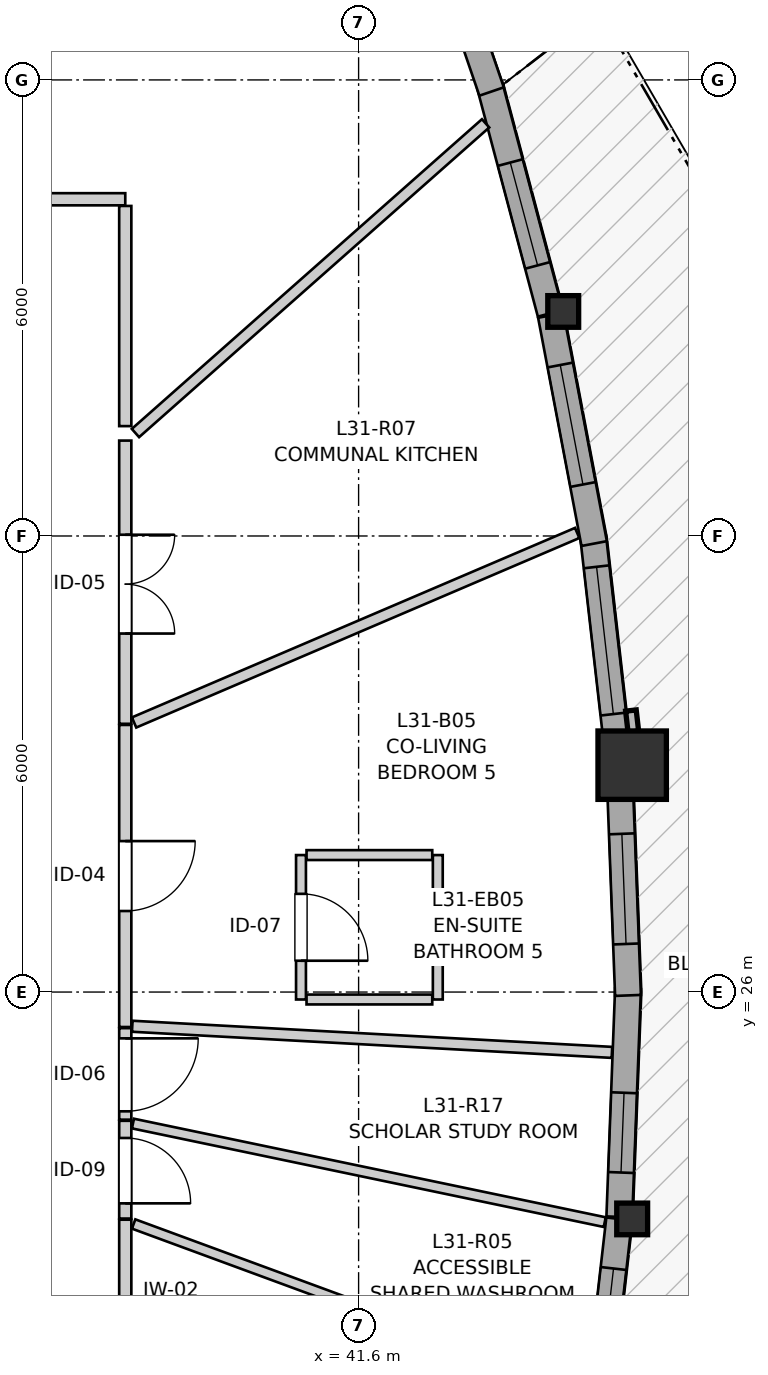
"""IFC4 building model, lengths in metres.
Left out: names, types, materials, properties, quantities, classifications, styles, units other than length and angle.
Written with IfcOpenShell. Run it as: python <this file> out.ifc"""

import sys

from ifc_helpers import new_model, si_unit, direction, frame, frame_2d, origin, origin_2d, place, context, subcontext, project, spatial, rectangle, i_section, extrude, source, transform, mapped, element, fill, save


model = new_model("IFC4")
c1 = context("Model", 3, precision=1e-05, world=origin(), true_north=direction((0.0, 1.0)))
c2 = subcontext(c1, "Body", "Model", "MODEL_VIEW")
j1 = project(units=[si_unit("LENGTHUNIT", "METRE"), si_unit("PLANEANGLEUNIT", "RADIAN")], contexts=[c1])
p1 = place(None, origin())
s1 = spatial("IfcSite", under=j1, at=p1, CompositionType="ELEMENT")
p2 = place(p1, origin())
s2 = spatial("IfcBuilding", under=s1, at=p2, CompositionType="ELEMENT")
p3 = place(p2, frame((0.0, 0.0, 105.6)))
s3 = spatial("IfcBuildingStorey", under=s2, at=p3, CompositionType="ELEMENT", Elevation=105.6)
m1 = source(origin(), c2, "Body", "SweptSolid", [
    extrude(i_section(OverallWidth=0.406, OverallDepth=0.416, WebThickness=0.027, FlangeThickness=0.044, FilletRadius=0.015, at=origin_2d()), origin(), (0.0, 0.0, 1.0), 2.935),
])
p4 = place(p3, frame((45.199, 23.015, 0.0), z_axis=(0.0, 0.0, 1.0), x_axis=(1.0, 0.0, 0.0)))
e1 = element("IfcColumn", 1, at=p4, inside=s3, PredefinedType="PILASTER", context=c2, shape_type="MappedRepresentation", body=[
    mapped(m1, transform((0.0, 0.0, 0.0), x_axis=(1.0, 0.0, 0.0), y_axis=(0.0, 1.0, 0.0), z_axis=(0.0, 0.0, 1.0), scale=1.0)),
])
m2 = source(origin(), c2, "Body", "SweptSolid", [
    extrude(rectangle(XDim=0.9, YDim=0.9, at=origin_2d()), origin(), (0.0, 0.0, 1.0), 2.935),
])
p5 = place(p3, frame((45.199, 28.985, 0.0), z_axis=(0.0, 0.0, 1.0), x_axis=(1.0, 0.0, 0.0)))
e2 = element("IfcColumn", 2, at=p5, inside=s3, PredefinedType="COLUMN", context=c2, shape_type="MappedRepresentation", body=[
    mapped(m2, transform((0.0, 0.0, 0.0), x_axis=(1.0, 0.0, 0.0), y_axis=(0.0, 1.0, 0.0), z_axis=(0.0, 0.0, 1.0), scale=1.0)),
])
p6 = place(p3, frame((44.292, 34.954, 0.0), z_axis=(0.0, 0.0, 1.0), x_axis=(1.0, 0.0, 0.0)))
e3 = element("IfcColumn", 3, at=p6, inside=s3, PredefinedType="PILASTER", context=c2, shape_type="MappedRepresentation", body=[
    mapped(m1, transform((0.0, 0.0, 0.0), x_axis=(1.0, 0.0, 0.0), y_axis=(0.0, 1.0, 0.0), z_axis=(0.0, 0.0, 1.0), scale=1.0)),
])
p7 = place(p3, frame((44.686, 20.012, 0.0), z_axis=(0.0, 0.0, 1.0), x_axis=(0.113268604106, 0.993564403209, 0.0)))
e4 = element("IfcWall", 4, at=p7, inside=s3, PredefinedType="SOLIDWALL", context=c2, shape_type="SweptSolid", body=[
    extrude(rectangle(XDim=3.022, YDim=0.34, at=frame_2d((1.511, 0.0))), origin(), (0.0, 0.0, 1.0), 2.465),
])
p8 = place(p7, frame((1.316, 0.0, 0.82)))
e5 = element("IfcOpeningElement", 5, at=p8, cuts=e4, PredefinedType="OPENING", context=c2, shape_type="SweptSolid", body=[
    extrude(rectangle(XDim=1.05, YDim=1.45, at=frame_2d((0.525, 0.725))), frame((0.0, 0.18, 0.0), z_axis=(0.0, -1.0, 0.0), x_axis=(1.0, 0.0, 0.0)), (0.0, 0.0, 1.0), 0.36),
])
p9 = place(p3, frame((45.031, 23.042, 0.0), z_axis=(0.0, 0.0, 1.0), x_axis=(0.037943223979, 0.999279896603, 0.0)))
e6 = element("IfcWall", 6, at=p9, inside=s3, PredefinedType="SOLIDWALL", context=c2, shape_type="SweptSolid", body=[
    extrude(rectangle(XDim=3.005, YDim=0.34, at=frame_2d((1.502, 0.0))), origin(), (0.0, 0.0, 1.0), 2.465),
])
p10 = place(p9, frame((0.584, 0.0, 0.82)))
e7 = element("IfcOpeningElement", 7, at=p10, cuts=e6, PredefinedType="OPENING", context=c2, shape_type="SweptSolid", body=[
    extrude(rectangle(XDim=1.05, YDim=1.45, at=frame_2d((0.525, 0.725))), frame((0.0, 0.18, 0.0), z_axis=(0.0, -1.0, 0.0), x_axis=(1.0, 0.0, 0.0)), (0.0, 0.0, 1.0), 0.36),
])
p11 = place(p3, frame((45.145, 25.956, 0.0), z_axis=(0.0, 0.0, 1.0), x_axis=(-0.038000333161, 0.9992777265, 0.0)))
e8 = element("IfcWall", 8, at=p11, inside=s3, PredefinedType="SOLIDWALL", context=c2, shape_type="SweptSolid", body=[
    extrude(rectangle(XDim=2.795, YDim=0.34, at=frame_2d((1.397, 0.0))), origin(), (0.0, 0.0, 1.0), 2.465),
])
p12 = place(p11, frame((0.677, 0.0, 0.82)))
e9 = element("IfcOpeningElement", 9, at=p12, cuts=e8, PredefinedType="OPENING", context=c2, shape_type="SweptSolid", body=[
    extrude(rectangle(XDim=1.45, YDim=1.25, at=frame_2d((0.725, 0.625))), frame((0.0, 0.18, 0.0), z_axis=(0.0, -1.0, 0.0), x_axis=(1.0, 0.0, 0.0)), (0.0, 0.0, 1.0), 0.36),
])
p13 = place(p3, frame((45.004, 29.194, 0.0), z_axis=(0.0, 0.0, 1.0), x_axis=(-0.113223342564, 0.993569562083, 0.0)))
e10 = element("IfcWall", 10, at=p13, inside=s3, PredefinedType="SOLIDWALL", context=c2, shape_type="SweptSolid", body=[
    extrude(rectangle(XDim=2.812, YDim=0.34, at=frame_2d((1.406, 0.0))), origin(), (0.0, 0.0, 1.0), 2.465),
])
p14 = place(p13, frame((0.466, 0.0, 0.82)))
e11 = element("IfcOpeningElement", 11, at=p14, cuts=e10, PredefinedType="OPENING", context=c2, shape_type="SweptSolid", body=[
    extrude(rectangle(XDim=1.95, YDim=1.4, at=frame_2d((0.975, 0.7))), frame((0.0, 0.18, 0.0), z_axis=(0.0, -1.0, 0.0), x_axis=(1.0, 0.0, 0.0)), (0.0, 0.0, 1.0), 0.36),
])
p15 = place(p3, frame((44.699, 31.9, 0.0), z_axis=(0.0, 0.0, 1.0), x_axis=(-0.186689944156, 0.982418884566, 0.0)))
e12 = element("IfcWall", 12, at=p15, inside=s3, PredefinedType="SOLIDWALL", context=c2, shape_type="SweptSolid", body=[
    extrude(rectangle(XDim=3.056, YDim=0.34, at=frame_2d((1.528, 0.0))), origin(), (0.0, 0.0, 1.0), 2.465),
])
p16 = place(p15, frame((0.791, 0.0, 0.82)))
e13 = element("IfcOpeningElement", 13, at=p16, cuts=e12, PredefinedType="OPENING", context=c2, shape_type="SweptSolid", body=[
    extrude(rectangle(XDim=1.6, YDim=1.35, at=frame_2d((0.8, 0.675))), frame((0.0, 0.18, 0.0), z_axis=(0.0, -1.0, 0.0), x_axis=(1.0, 0.0, 0.0)), (0.0, 0.0, 1.0), 0.36),
])
p17 = place(p3, frame((44.123, 34.93, 0.0), z_axis=(0.0, 0.0, 1.0), x_axis=(-0.257080487516, 0.96638999526, 0.0)))
e14 = element("IfcWall", 14, at=p17, inside=s3, PredefinedType="SOLIDWALL", context=c2, shape_type="SweptSolid", body=[
    extrude(rectangle(XDim=3.106, YDim=0.34, at=frame_2d((1.553, 0.0))), origin(), (0.0, 0.0, 1.0), 2.465),
])
p18 = place(p17, frame((0.652, 0.0, 0.82)))
e15 = element("IfcOpeningElement", 15, at=p18, cuts=e14, PredefinedType="OPENING", context=c2, shape_type="SweptSolid", body=[
    extrude(rectangle(XDim=1.4, YDim=1.35, at=frame_2d((0.7, 0.675))), frame((0.0, 0.18, 0.0), z_axis=(0.0, -1.0, 0.0), x_axis=(1.0, 0.0, 0.0)), (0.0, 0.0, 1.0), 0.36),
])
p19 = place(p3, frame((43.35, 37.848, 0.0), z_axis=(0.0, 0.0, 1.0), x_axis=(-0.323561473353, 0.946207151189, 0.0)))
e16 = element("IfcWall", 16, at=p19, inside=s3, PredefinedType="SOLIDWALL", context=c2, shape_type="SweptSolid", body=[
    extrude(rectangle(XDim=2.962, YDim=0.34, at=frame_2d((1.481, 0.0))), origin(), (0.0, 0.0, 1.0), 2.465),
])
p20 = place(p19, frame((0.861, 0.0, 0.82)))
e17 = element("IfcOpeningElement", 17, at=p20, cuts=e16, PredefinedType="OPENING", context=c2, shape_type="SweptSolid", body=[
    extrude(rectangle(XDim=1.25, YDim=1.35, at=frame_2d((0.625, 0.675))), frame((0.0, 0.18, 0.0), z_axis=(0.0, -1.0, 0.0), x_axis=(1.0, 0.0, 0.0)), (0.0, 0.0, 1.0), 0.36),
])
p21 = place(p3, frame((38.53, 23.005, 0.0), z_axis=(0.0, 0.0, 1.0), x_axis=(0.0, -1.0, 0.0)))
e18 = element("IfcWall", 18, at=p21, inside=s3, PredefinedType="PARTITIONING", context=c2, shape_type="SweptSolid", body=[
    extrude(rectangle(XDim=6.157, YDim=0.16, at=frame_2d((3.079, 0.0))), origin(), (0.0, 0.0, 1.0), 2.935),
])
p22 = place(p21, frame((2.615, 0.0, 0.0)))
e19 = element("IfcOpeningElement", 19, at=p22, cuts=e18, PredefinedType="OPENING", context=c2, shape_type="SweptSolid", body=[
    extrude(rectangle(XDim=0.92, YDim=2.1, at=frame_2d((0.46, 1.05))), frame((0.0, 0.09, 0.0), z_axis=(0.0, -1.0, 0.0), x_axis=(1.0, 0.0, 0.0)), (0.0, 0.0, 1.0), 0.18),
])
p23 = place(p3, frame((33.906, 36.43, 0.0), z_axis=(0.0, 0.0, 1.0), x_axis=(1.0, 0.0, 0.0)))
e20 = element("IfcWall", 20, at=p23, inside=s3, PredefinedType="PARTITIONING", context=c2, shape_type="SweptSolid", body=[
    extrude(rectangle(XDim=4.624, YDim=0.16, at=frame_2d((2.312, 0.0))), origin(), (0.0, 0.0, 1.0), 2.573),
])
p24 = place(p23, frame((1.84, 0.0, 0.0)))
e21 = element("IfcOpeningElement", 21, at=p24, cuts=e20, PredefinedType="OPENING", context=c2, shape_type="SweptSolid", body=[
    extrude(rectangle(XDim=0.96, YDim=2.1, at=frame_2d((0.48, 1.05))), frame((0.0, 0.09, 0.0), z_axis=(0.0, -1.0, 0.0), x_axis=(1.0, 0.0, 0.0)), (0.0, 0.0, 1.0), 0.18),
])
p25 = place(p3, frame((38.53, 29.514, 0.0), z_axis=(0.0, 0.0, 1.0), x_axis=(0.0, -1.0, 0.0)))
e22 = element("IfcWall", 22, at=p25, inside=s3, PredefinedType="PARTITIONING", context=c2, shape_type="SweptSolid", body=[
    extrude(rectangle(XDim=3.974, YDim=0.16, at=frame_2d((1.987, 0.0))), origin(), (0.0, 0.0, 1.0), 2.935),
])
p26 = place(p25, frame((1.528, 0.0, 0.0)))
e23 = element("IfcOpeningElement", 23, at=p26, cuts=e22, PredefinedType="OPENING", context=c2, shape_type="SweptSolid", body=[
    extrude(rectangle(XDim=0.92, YDim=2.1, at=frame_2d((0.46, 1.05))), frame((0.0, 0.09, 0.0), z_axis=(0.0, -1.0, 0.0), x_axis=(1.0, 0.0, 0.0)), (0.0, 0.0, 1.0), 0.18),
])
p27 = place(p3, frame((38.53, 33.255, 0.0), z_axis=(0.0, 0.0, 1.0), x_axis=(0.0, -1.0, 0.0)))
e24 = element("IfcWall", 24, at=p27, inside=s3, PredefinedType="PARTITIONING", context=c2, shape_type="SweptSolid", body=[
    extrude(rectangle(XDim=3.726, YDim=0.16, at=frame_2d((1.863, 0.0))), origin(), (0.0, 0.0, 1.0), 2.935),
])
p28 = place(p27, frame((1.239, 0.0, 0.0)))
e25 = element("IfcOpeningElement", 25, at=p28, cuts=e24, PredefinedType="OPENING", context=c2, shape_type="SweptSolid", body=[
    extrude(rectangle(XDim=1.3, YDim=2.1, at=frame_2d((0.65, 1.05))), frame((0.0, 0.09, 0.0), z_axis=(0.0, -1.0, 0.0), x_axis=(1.0, 0.0, 0.0)), (0.0, 0.0, 1.0), 0.18),
])
p29 = place(p3, frame((40.842, 27.802, 0.0), z_axis=(0.0, 0.0, 1.0), x_axis=(0.0, -1.0, 0.0)))
e26 = element("IfcWall", 26, at=p29, inside=s3, PredefinedType="PARTITIONING", context=c2, shape_type="SweptSolid", body=[
    extrude(rectangle(XDim=1.9, YDim=0.13, at=frame_2d((0.95, 0.0))), origin(), (0.0, 0.0, 1.0), 2.935),
])
p30 = place(p29, frame((0.51, 0.0, 0.0)))
e27 = element("IfcOpeningElement", 27, at=p30, cuts=e26, PredefinedType="OPENING", context=c2, shape_type="SweptSolid", body=[
    extrude(rectangle(XDim=0.88, YDim=2.05, at=frame_2d((0.44, 1.025))), frame((0.0, 0.075, 0.0), z_axis=(0.0, -1.0, 0.0), x_axis=(1.0, 0.0, 0.0)), (0.0, 0.0, 1.0), 0.15),
])
p31 = place(p3, frame((38.53, 24.306, 0.0), z_axis=(0.0, 0.0, 1.0), x_axis=(0.0, -1.0, 0.0)))
e28 = element("IfcWall", 28, at=p31, inside=s3, PredefinedType="PARTITIONING", context=c2, shape_type="SweptSolid", body=[
    extrude(rectangle(XDim=1.286, YDim=0.16, at=frame_2d((0.643, 0.0))), origin(), (0.0, 0.0, 1.0), 2.935),
])
p32 = place(p31, frame((0.226, 0.0, 0.0)))
e29 = element("IfcOpeningElement", 29, at=p32, cuts=e28, PredefinedType="OPENING", context=c2, shape_type="SweptSolid", body=[
    extrude(rectangle(XDim=0.86, YDim=2.05, at=frame_2d((0.43, 1.025))), frame((0.0, 0.09, 0.0), z_axis=(0.0, -1.0, 0.0), x_axis=(1.0, 0.0, 0.0)), (0.0, 0.0, 1.0), 0.18),
])
p33 = place(p3, frame((38.53, 25.525, 0.0), z_axis=(0.0, 0.0, 1.0), x_axis=(0.0, -1.0, 0.0)))
e30 = element("IfcWall", 30, at=p33, inside=s3, PredefinedType="PARTITIONING", context=c2, shape_type="SweptSolid", body=[
    extrude(rectangle(XDim=1.204, YDim=0.16, at=frame_2d((0.602, 0.0))), origin(), (0.0, 0.0, 1.0), 2.935),
])
p34 = place(p33, frame((0.134, 0.0, 0.0)))
e31 = element("IfcOpeningElement", 31, at=p34, cuts=e30, PredefinedType="OPENING", context=c2, shape_type="SweptSolid", body=[
    extrude(rectangle(XDim=0.96, YDim=2.1, at=frame_2d((0.48, 1.05))), frame((0.0, 0.09, 0.0), z_axis=(0.0, -1.0, 0.0), x_axis=(1.0, 0.0, 0.0)), (0.0, 0.0, 1.0), 0.18),
])
p35 = place(p3, frame((38.646, 29.546, 0.0), z_axis=(0.0, 0.0, 1.0), x_axis=(0.919441504603, 0.393226804293, 0.0)))
e32 = element("IfcWall", 32, at=p35, inside=s3, PredefinedType="PARTITIONING", context=c2, shape_type="SweptSolid", body=[
    extrude(rectangle(XDim=6.341, YDim=0.145, at=frame_2d((3.17, 0.0))), origin(), (0.0, 0.0, 1.0), 2.935),
])
p36 = place(p3, frame((38.64, 22.948, 0.0), z_axis=(0.0, 0.0, 1.0), x_axis=(0.938426101424, -0.3454800315, 0.0)))
e33 = element("IfcWall", 33, at=p36, inside=s3, PredefinedType="PARTITIONING", context=c2, shape_type="SweptSolid", body=[
    extrude(rectangle(XDim=6.327, YDim=0.13, at=frame_2d((3.164, 0.0))), origin(), (0.0, 0.0, 1.0), 2.935),
])
p37 = place(p3, frame((38.631, 24.27, 0.0), z_axis=(0.0, 0.0, 1.0), x_axis=(0.978856283814, -0.204549201019, 0.0)))
e34 = element("IfcWall", 34, at=p37, inside=s3, PredefinedType="PARTITIONING", context=c2, shape_type="SweptSolid", body=[
    extrude(rectangle(XDim=6.341, YDim=0.13, at=frame_2d((3.171, 0.0))), origin(), (0.0, 0.0, 1.0), 2.935),
])
p38 = place(p3, frame((38.622, 25.55, 0.0), z_axis=(0.0, 0.0, 1.0), x_axis=(0.998518036703, -0.054421782211, 0.0)))
e35 = element("IfcWall", 35, at=p38, inside=s3, PredefinedType="PARTITIONING", context=c2, shape_type="SweptSolid", body=[
    extrude(rectangle(XDim=6.321, YDim=0.145, at=frame_2d((3.16, 0.0))), origin(), (0.0, 0.0, 1.0), 2.935),
])
p39 = place(p3, frame((38.664, 33.354, 0.0), z_axis=(0.0, 0.0, 1.0), x_axis=(0.749069296105, 0.662491652501, 0.0)))
e36 = element("IfcWall", 36, at=p39, inside=s3, PredefinedType="PARTITIONING", context=c2, shape_type="SweptSolid", body=[
    extrude(rectangle(XDim=6.15, YDim=0.145, at=frame_2d((3.075, 0.0))), origin(), (0.0, 0.0, 1.0), 2.935),
])
p40 = place(p3, frame((38.53, 33.446, 0.0), z_axis=(0.0, 0.0, 1.0), x_axis=(0.0, 1.0, 0.0)))
e37 = element("IfcWall", 37, at=p40, inside=s3, PredefinedType="PARTITIONING", context=c2, shape_type="SweptSolid", body=[
    extrude(rectangle(XDim=2.896, YDim=0.16, at=frame_2d((1.448, 0.0))), origin(), (0.0, 0.0, 1.0), 2.573),
])
p41 = place(p3, frame((42.642, 25.902, 0.0), z_axis=(0.0, 0.0, 1.0), x_axis=(0.0, 1.0, 0.0)))
e38 = element("IfcWall", 38, at=p41, inside=s3, PredefinedType="PARTITIONING", context=c2, shape_type="SweptSolid", body=[
    extrude(rectangle(XDim=1.9, YDim=0.13, at=frame_2d((0.95, 0.0))), origin(), (0.0, 0.0, 1.0), 2.543),
])
for number, where, z_axis, x_axis in (
    (39, (40.915, 27.802, 0.0), (0.0, 0.0, 1.0), (1.0, 0.0, 0.0)),
    (40, (40.915, 25.902, 0.0), (0.0, 0.0, 1.0), (1.0, 0.0, 0.0)),
):
    element("IfcWall", number, at=place(p3, frame(where, z_axis=z_axis, x_axis=x_axis)), inside=s3, PredefinedType="PARTITIONING", context=c2, shape_type="SweptSolid", body=[
        extrude(rectangle(XDim=1.654, YDim=0.13, at=frame_2d((0.827, 0.0))), origin(), (0.0, 0.0, 1.0), 2.935),
    ])
m3 = source(origin(), c2, "Body", "SweptSolid", [
    extrude(rectangle(XDim=1.05, YDim=1.45, at=frame_2d((0.525, 0.725))), frame((0.0, 0.03, 0.0), z_axis=(0.0, -1.0, 0.0), x_axis=(1.0, 0.0, 0.0)), (0.0, 0.0, 1.0), 0.06),
])
p42 = place(p8, origin())
e41 = element("IfcWindow", 41, at=p42, inside=s3, PartitioningType="SINGLE_PANEL", PredefinedType="WINDOW", context=c2, shape_type="MappedRepresentation", body=[
    mapped(m3, transform((0.0, 0.0, 0.0), x_axis=(1.0, 0.0, 0.0), y_axis=(0.0, 1.0, 0.0), z_axis=(0.0, 0.0, 1.0), scale=1.0)),
])
fill(e5, e41)
p43 = place(p10, origin())
e42 = element("IfcWindow", 42, at=p43, inside=s3, PartitioningType="SINGLE_PANEL", PredefinedType="WINDOW", context=c2, shape_type="MappedRepresentation", body=[
    mapped(m3, transform((0.0, 0.0, 0.0), x_axis=(1.0, 0.0, 0.0), y_axis=(0.0, 1.0, 0.0), z_axis=(0.0, 0.0, 1.0), scale=1.0)),
])
fill(e7, e42)
m4 = source(origin(), c2, "Body", "SweptSolid", [
    extrude(rectangle(XDim=1.45, YDim=1.25, at=frame_2d((0.725, 0.625))), frame((0.0, 0.03, 0.0), z_axis=(0.0, -1.0, 0.0), x_axis=(1.0, 0.0, 0.0)), (0.0, 0.0, 1.0), 0.06),
])
p44 = place(p12, origin())
e43 = element("IfcWindow", 43, at=p44, inside=s3, PartitioningType="SINGLE_PANEL", PredefinedType="WINDOW", context=c2, shape_type="MappedRepresentation", body=[
    mapped(m4, transform((0.0, 0.0, 0.0), x_axis=(1.0, 0.0, 0.0), y_axis=(0.0, 1.0, 0.0), z_axis=(0.0, 0.0, 1.0), scale=1.0)),
])
fill(e9, e43)
m5 = source(origin(), c2, "Body", "SweptSolid", [
    extrude(rectangle(XDim=1.95, YDim=1.4, at=frame_2d((0.975, 0.7))), frame((0.0, 0.03, 0.0), z_axis=(0.0, -1.0, 0.0), x_axis=(1.0, 0.0, 0.0)), (0.0, 0.0, 1.0), 0.06),
])
p45 = place(p14, origin())
e44 = element("IfcWindow", 44, at=p45, inside=s3, PartitioningType="SINGLE_PANEL", PredefinedType="WINDOW", context=c2, shape_type="MappedRepresentation", body=[
    mapped(m5, transform((0.0, 0.0, 0.0), x_axis=(1.0, 0.0, 0.0), y_axis=(0.0, 1.0, 0.0), z_axis=(0.0, 0.0, 1.0), scale=1.0)),
])
fill(e11, e44)
m6 = source(origin(), c2, "Body", "SweptSolid", [
    extrude(rectangle(XDim=1.6, YDim=1.35, at=frame_2d((0.8, 0.675))), frame((0.0, 0.03, 0.0), z_axis=(0.0, -1.0, 0.0), x_axis=(1.0, 0.0, 0.0)), (0.0, 0.0, 1.0), 0.06),
])
p46 = place(p16, origin())
e45 = element("IfcWindow", 45, at=p46, inside=s3, PartitioningType="SINGLE_PANEL", PredefinedType="WINDOW", context=c2, shape_type="MappedRepresentation", body=[
    mapped(m6, transform((0.0, 0.0, 0.0), x_axis=(1.0, 0.0, 0.0), y_axis=(0.0, 1.0, 0.0), z_axis=(0.0, 0.0, 1.0), scale=1.0)),
])
fill(e13, e45)
m7 = source(origin(), c2, "Body", "SweptSolid", [
    extrude(rectangle(XDim=1.4, YDim=1.35, at=frame_2d((0.7, 0.675))), frame((0.0, 0.03, 0.0), z_axis=(0.0, -1.0, 0.0), x_axis=(1.0, 0.0, 0.0)), (0.0, 0.0, 1.0), 0.06),
])
p47 = place(p18, origin())
e46 = element("IfcWindow", 46, at=p47, inside=s3, PartitioningType="SINGLE_PANEL", PredefinedType="WINDOW", context=c2, shape_type="MappedRepresentation", body=[
    mapped(m7, transform((0.0, 0.0, 0.0), x_axis=(1.0, 0.0, 0.0), y_axis=(0.0, 1.0, 0.0), z_axis=(0.0, 0.0, 1.0), scale=1.0)),
])
fill(e15, e46)
m8 = source(origin(), c2, "Body", "SweptSolid", [
    extrude(rectangle(XDim=0.92, YDim=2.1, at=frame_2d((0.46, 1.05))), frame((0.0, 0.025, 0.0), z_axis=(0.0, -1.0, 0.0), x_axis=(1.0, 0.0, 0.0)), (0.0, 0.0, 1.0), 0.05),
])
p48 = place(p26, origin())
e47 = element("IfcDoor", 47, at=p48, inside=s3, OperationType="SINGLE_SWING_LEFT", PredefinedType="DOOR", context=c2, shape_type="MappedRepresentation", body=[
    mapped(m8, transform((0.0, 0.0, 0.0), x_axis=(1.0, 0.0, 0.0), y_axis=(0.0, 1.0, 0.0), z_axis=(0.0, 0.0, 1.0), scale=1.0)),
])
fill(e23, e47)
m9 = source(origin(), c2, "Body", "SweptSolid", [
    extrude(rectangle(XDim=1.3, YDim=2.1, at=frame_2d((0.65, 1.05))), frame((0.0, 0.025, 0.0), z_axis=(0.0, -1.0, 0.0), x_axis=(1.0, 0.0, 0.0)), (0.0, 0.0, 1.0), 0.05),
])
p49 = place(p28, origin())
e48 = element("IfcDoor", 48, at=p49, inside=s3, OperationType="DOUBLE_DOOR_SINGLE_SWING", PredefinedType="DOOR", context=c2, shape_type="MappedRepresentation", body=[
    mapped(m9, transform((0.0, 0.0, 0.0), x_axis=(1.0, 0.0, 0.0), y_axis=(0.0, 1.0, 0.0), z_axis=(0.0, 0.0, 1.0), scale=1.0)),
])
fill(e25, e48)
m10 = source(origin(), c2, "Body", "SweptSolid", [
    extrude(rectangle(XDim=0.88, YDim=2.05, at=frame_2d((0.44, 1.025))), frame((0.0, 0.025, 0.0), z_axis=(0.0, -1.0, 0.0), x_axis=(1.0, 0.0, 0.0)), (0.0, 0.0, 1.0), 0.05),
])
p50 = place(p30, origin())
e49 = element("IfcDoor", 49, at=p50, inside=s3, OperationType="SINGLE_SWING_RIGHT", PredefinedType="DOOR", context=c2, shape_type="MappedRepresentation", body=[
    mapped(m10, transform((0.0, 0.0, 0.0), x_axis=(1.0, 0.0, 0.0), y_axis=(0.0, 1.0, 0.0), z_axis=(0.0, 0.0, 1.0), scale=1.0)),
])
fill(e27, e49)
m11 = source(origin(), c2, "Body", "SweptSolid", [
    extrude(rectangle(XDim=0.86, YDim=2.05, at=frame_2d((0.43, 1.025))), frame((0.0, 0.025, 0.0), z_axis=(0.0, -1.0, 0.0), x_axis=(1.0, 0.0, 0.0)), (0.0, 0.0, 1.0), 0.05),
])
p51 = place(p32, origin())
e50 = element("IfcDoor", 50, at=p51, inside=s3, OperationType="SINGLE_SWING_RIGHT", PredefinedType="DOOR", context=c2, shape_type="MappedRepresentation", body=[
    mapped(m11, transform((0.0, 0.0, 0.0), x_axis=(1.0, 0.0, 0.0), y_axis=(0.0, 1.0, 0.0), z_axis=(0.0, 0.0, 1.0), scale=1.0)),
])
fill(e29, e50)
m12 = source(origin(), c2, "Body", "SweptSolid", [
    extrude(rectangle(XDim=0.96, YDim=2.1, at=frame_2d((0.48, 1.05))), frame((0.0, 0.025, 0.0), z_axis=(0.0, -1.0, 0.0), x_axis=(1.0, 0.0, 0.0)), (0.0, 0.0, 1.0), 0.05),
])
p52 = place(p34, origin())
e51 = element("IfcDoor", 51, at=p52, inside=s3, OperationType="SINGLE_SWING_LEFT", PredefinedType="DOOR", context=c2, shape_type="MappedRepresentation", body=[
    mapped(m12, transform((0.0, 0.0, 0.0), x_axis=(1.0, 0.0, 0.0), y_axis=(0.0, 1.0, 0.0), z_axis=(0.0, 0.0, 1.0), scale=1.0)),
])
fill(e31, e51)
save(model, sys.argv[1])
